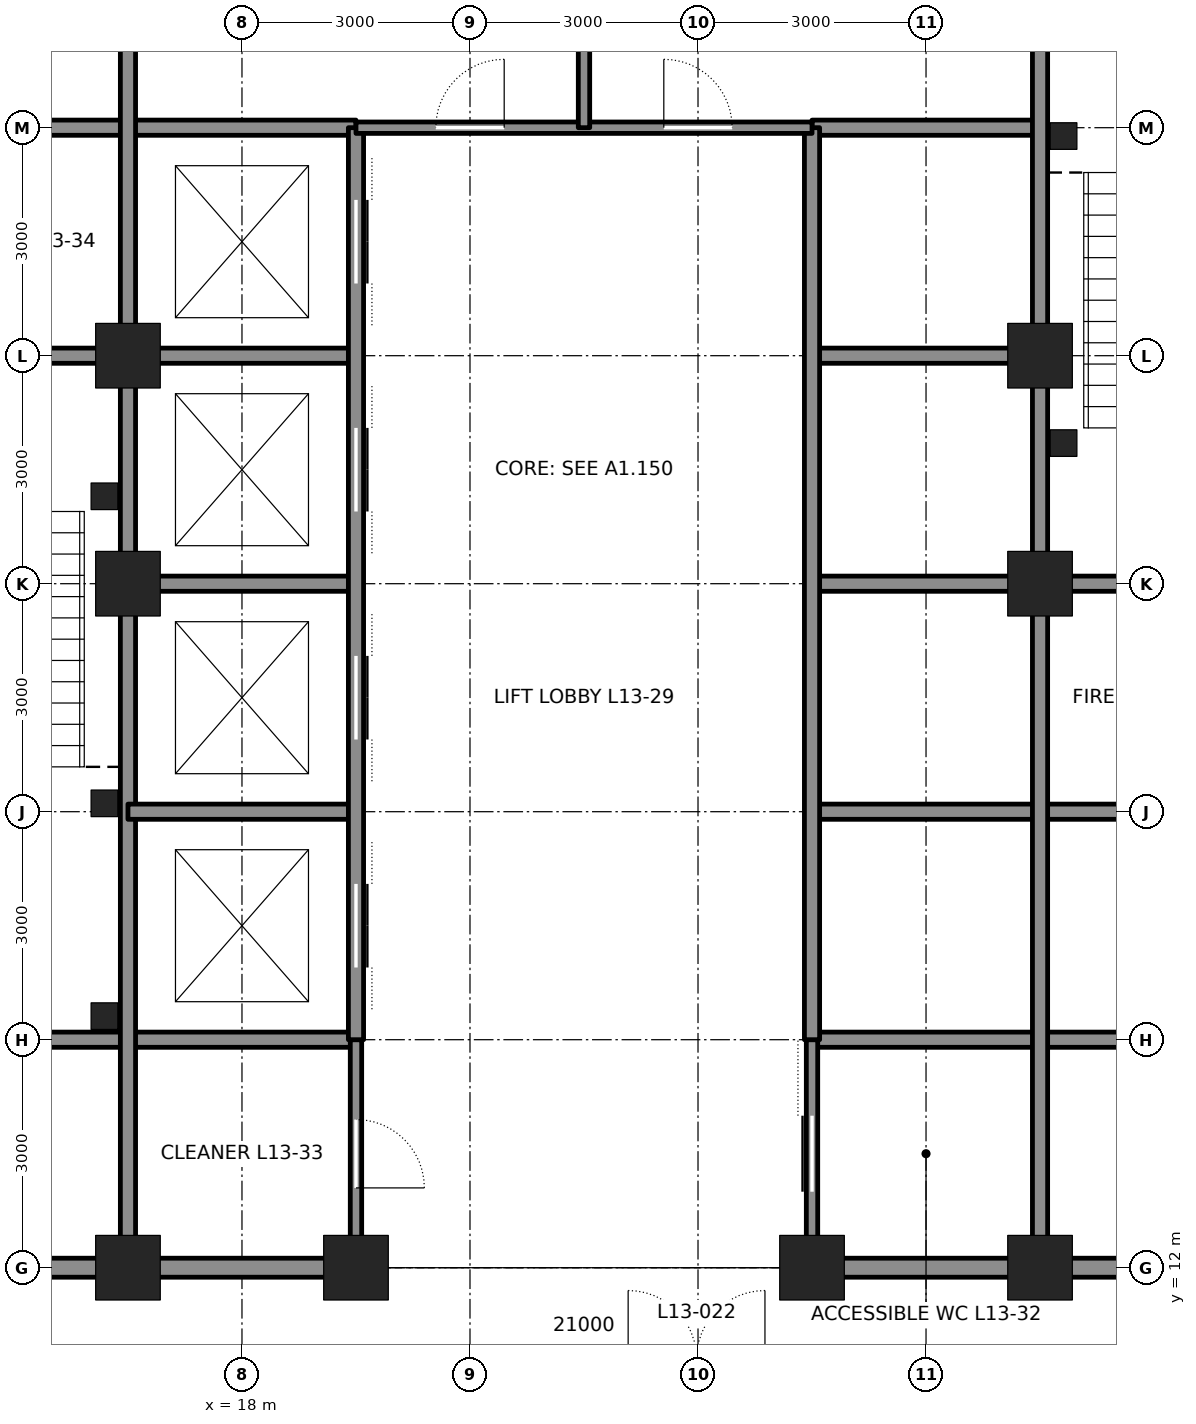
"""IFC4 building model, lengths in metres.
Left out: names, types, materials, properties, quantities, classifications, styles, units other than length and angle.
Written with IfcOpenShell. Run it as: python <this file> out.ifc"""

import sys

from ifc_helpers import new_model, si_unit, direction, frame, frame_2d, origin, origin_2d, place, context, subcontext, project, spatial, rectangle, hollow_rectangle, extrude, element, fill, save


model = new_model("IFC4")
c1 = context("Model", 3, precision=1e-05, world=origin(), true_north=direction((0.0, 1.0)))
c2 = subcontext(c1, "Body", "Model", "MODEL_VIEW")
j1 = project(units=[si_unit("LENGTHUNIT", "METRE"), si_unit("PLANEANGLEUNIT", "RADIAN")], contexts=[c1])
p1 = place(None, origin())
s1 = spatial("IfcSite", under=j1, at=p1, CompositionType="ELEMENT")
p2 = place(p1, origin())
s2 = spatial("IfcBuilding", under=s1, at=p2, CompositionType="ELEMENT")
p3 = place(p2, frame((0.0, 0.0, 64.8)))
s3 = spatial("IfcBuildingStorey", under=s2, at=p3, CompositionType="ELEMENT", Elevation=64.8)
for number, where, z_axis, x_axis in (
    (1, (16.5, 12.0, 0.0), (0.0, 0.0, 1.0), (1.0, 0.0, 0.0)),
    (2, (19.5, 12.0, 0.0), (0.0, 0.0, 1.0), (1.0, 0.0, 0.0)),
    (3, (25.5, 12.0, 0.0), (0.0, 0.0, 1.0), (1.0, 0.0, 0.0)),
    (4, (28.5, 12.0, 0.0), (0.0, 0.0, 1.0), (1.0, 0.0, 0.0)),
    (5, (16.5, 21.0, 0.0), (0.0, 0.0, 1.0), (1.0, 0.0, 0.0)),
    (6, (16.5, 24.0, 0.0), (0.0, 0.0, 1.0), (1.0, 0.0, 0.0)),
    (7, (28.5, 21.0, 0.0), (0.0, 0.0, 1.0), (1.0, 0.0, 0.0)),
    (8, (28.5, 24.0, 0.0), (0.0, 0.0, 1.0), (1.0, 0.0, 0.0)),
):
    element("IfcColumn", number, at=place(p3, frame(where, z_axis=z_axis, x_axis=x_axis)), inside=s3, PredefinedType="COLUMN", context=c2, shape_type="SweptSolid", body=[
        extrude(hollow_rectangle(XDim=0.85, YDim=0.85, WallThickness=0.085, at=origin_2d()), origin(), (0.0, 0.0, 1.0), 4.5),
    ])
p4 = place(p3, frame((12.25, 12.0, 0.0), z_axis=(0.0, 0.0, 1.0), x_axis=(1.0, 0.0, 0.0)))
e9 = element("IfcWall", 9, at=p4, inside=s3, PredefinedType="SOLIDWALL", context=c2, shape_type="SweptSolid", body=[
    extrude(rectangle(XDim=4.0, YDim=0.25, at=frame_2d((2.0, 0.0))), origin(), (0.0, 0.0, 1.0), 3.181),
])
for number, where, z_axis, x_axis in (
    (10, (16.75, 12.0, 0.0), (0.0, 0.0, 1.0), (1.0, 0.0, 0.0)),
    (11, (25.75, 12.0, 0.0), (0.0, 0.0, 1.0), (1.0, 0.0, 0.0)),
):
    element("IfcWall", number, at=place(p3, frame(where, z_axis=z_axis, x_axis=x_axis)), inside=s3, PredefinedType="SOLIDWALL", context=c2, shape_type="SweptSolid", body=[
        extrude(rectangle(XDim=2.5, YDim=0.25, at=frame_2d((1.25, 0.0))), origin(), (0.0, 0.0, 1.0), 3.181),
    ])
p5 = place(p3, frame((28.75, 12.0, 0.0), z_axis=(0.0, 0.0, 1.0), x_axis=(1.0, 0.0, 0.0)))
e12 = element("IfcWall", 12, at=p5, inside=s3, PredefinedType="SOLIDWALL", context=c2, shape_type="SweptSolid", body=[
    extrude(rectangle(XDim=4.0, YDim=0.25, at=frame_2d((2.0, 0.0))), origin(), (0.0, 0.0, 1.0), 3.181),
])
for number, where, z_axis, x_axis in (
    (13, (12.0, 15.0, 0.0), (0.0, 0.0, 1.0), (1.0, 0.0, 0.0)),
    (14, (25.5, 15.0, 0.0), (0.0, 0.0, 1.0), (1.0, 0.0, 0.0)),
):
    element("IfcWall", number, at=place(p3, frame(where, z_axis=z_axis, x_axis=x_axis)), inside=s3, PredefinedType="SOLIDWALL", context=c2, shape_type="SweptSolid", body=[
        extrude(rectangle(XDim=7.5, YDim=0.2, at=frame_2d((3.75, 0.0))), origin(), (0.0, 0.0, 1.0), 4.34),
    ])
p6 = place(p3, frame((12.25, 24.0, 0.0), z_axis=(0.0, 0.0, 1.0), x_axis=(1.0, 0.0, 0.0)))
e15 = element("IfcWall", 15, at=p6, inside=s3, PredefinedType="SOLIDWALL", context=c2, shape_type="SweptSolid", body=[
    extrude(rectangle(XDim=4.0, YDim=0.2, at=frame_2d((2.0, 0.0))), origin(), (0.0, 0.0, 1.0), 3.39),
])
p7 = place(p6, frame((1.4, 0.0, 0.0)))
e16 = element("IfcOpeningElement", 16, at=p7, cuts=e15, PredefinedType="OPENING", context=c2, shape_type="SweptSolid", body=[
    extrude(rectangle(XDim=1.2, YDim=2.1, at=frame_2d((0.6, 1.05))), frame((0.0, 0.11, 0.0), z_axis=(0.0, -1.0, 0.0), x_axis=(1.0, 0.0, 0.0)), (0.0, 0.0, 1.0), 0.22),
])
for number, where, z_axis, x_axis in (
    (17, (16.75, 24.0, 0.0), (0.0, 0.0, 1.0), (1.0, 0.0, 0.0)),
    (18, (25.5, 24.0, 0.0), (0.0, 0.0, 1.0), (1.0, 0.0, 0.0)),
):
    element("IfcWall", number, at=place(p3, frame(where, z_axis=z_axis, x_axis=x_axis)), inside=s3, PredefinedType="SOLIDWALL", context=c2, shape_type="SweptSolid", body=[
        extrude(rectangle(XDim=2.75, YDim=0.2, at=frame_2d((1.375, 0.0))), origin(), (0.0, 0.0, 1.0), 3.39),
    ])
p8 = place(p3, frame((12.0, 27.0, 0.0), z_axis=(0.0, 0.0, 1.0), x_axis=(1.0, 0.0, 0.0)))
e19 = element("IfcWall", 19, at=p8, inside=s3, PredefinedType="SOLIDWALL", context=c2, shape_type="SweptSolid", body=[
    extrude(rectangle(XDim=7.5, YDim=0.2, at=frame_2d((3.75, 0.0))), origin(), (0.0, 0.0, 1.0), 4.34),
])
p9 = place(p8, frame((1.65, 0.0, 0.0)))
e20 = element("IfcOpeningElement", 20, at=p9, cuts=e19, PredefinedType="OPENING", context=c2, shape_type="SweptSolid", body=[
    extrude(rectangle(XDim=1.2, YDim=2.1, at=frame_2d((0.6, 1.05))), frame((0.0, 0.11, 0.0), z_axis=(0.0, -1.0, 0.0), x_axis=(1.0, 0.0, 0.0)), (0.0, 0.0, 1.0), 0.22),
])
p10 = place(p3, frame((25.5, 27.0, 0.0), z_axis=(0.0, 0.0, 1.0), x_axis=(1.0, 0.0, 0.0)))
e21 = element("IfcWall", 21, at=p10, inside=s3, PredefinedType="SOLIDWALL", context=c2, shape_type="SweptSolid", body=[
    extrude(rectangle(XDim=3.0, YDim=0.2, at=frame_2d((1.5, 0.0))), origin(), (0.0, 0.0, 1.0), 4.34),
])
p11 = place(p3, frame((16.5, 12.25, 0.0), z_axis=(0.0, 0.0, 1.0), x_axis=(0.0, 1.0, 0.0)))
e22 = element("IfcWall", 22, at=p11, inside=s3, PredefinedType="SOLIDWALL", context=c2, shape_type="SweptSolid", body=[
    extrude(rectangle(XDim=8.5, YDim=0.2, at=frame_2d((4.25, 0.0))), origin(), (0.0, 0.0, 1.0), 3.413),
])
p12 = place(p3, frame((16.5, 21.25, 0.0), z_axis=(0.0, 0.0, 1.0), x_axis=(0.0, 1.0, 0.0)))
e23 = element("IfcWall", 23, at=p12, inside=s3, PredefinedType="SOLIDWALL", context=c2, shape_type="SweptSolid", body=[
    extrude(rectangle(XDim=2.5, YDim=0.2, at=frame_2d((1.25, 0.0))), origin(), (0.0, 0.0, 1.0), 3.413),
])
p13 = place(p3, frame((16.5, 24.25, 0.0), z_axis=(0.0, 0.0, 1.0), x_axis=(0.0, 1.0, 0.0)))
e24 = element("IfcWall", 24, at=p13, inside=s3, PredefinedType="SOLIDWALL", context=c2, shape_type="SweptSolid", body=[
    extrude(rectangle(XDim=8.5, YDim=0.2, at=frame_2d((4.25, 0.0))), origin(), (0.0, 0.0, 1.0), 3.413),
])
p14 = place(p3, frame((16.5, 18.0, 0.0), z_axis=(0.0, 0.0, 1.0), x_axis=(1.0, 0.0, 0.0)))
e25 = element("IfcWall", 25, at=p14, inside=s3, PredefinedType="SOLIDWALL", context=c2, shape_type="SweptSolid", body=[
    extrude(rectangle(XDim=3.0, YDim=0.2, at=frame_2d((1.5, 0.0))), origin(), (0.0, 0.0, 1.0), 4.34),
])
p15 = place(p3, frame((25.5, 18.0, 0.0), z_axis=(0.0, 0.0, 1.0), x_axis=(1.0, 0.0, 0.0)))
e26 = element("IfcWall", 26, at=p15, inside=s3, PredefinedType="SOLIDWALL", context=c2, shape_type="SweptSolid", body=[
    extrude(rectangle(XDim=7.5, YDim=0.2, at=frame_2d((3.75, 0.0))), origin(), (0.0, 0.0, 1.0), 4.34),
])
p16 = place(p15, frame((4.65, 0.0, 0.0)))
e27 = element("IfcOpeningElement", 27, at=p16, cuts=e26, PredefinedType="OPENING", context=c2, shape_type="SweptSolid", body=[
    extrude(rectangle(XDim=1.2, YDim=2.1, at=frame_2d((0.6, 1.05))), frame((0.0, 0.11, 0.0), z_axis=(0.0, -1.0, 0.0), x_axis=(1.0, 0.0, 0.0)), (0.0, 0.0, 1.0), 0.22),
])
for number, where, z_axis, x_axis in (
    (28, (16.75, 21.0, 0.0), (0.0, 0.0, 1.0), (1.0, 0.0, 0.0)),
    (29, (25.5, 21.0, 0.0), (0.0, 0.0, 1.0), (1.0, 0.0, 0.0)),
):
    element("IfcWall", number, at=place(p3, frame(where, z_axis=z_axis, x_axis=x_axis)), inside=s3, PredefinedType="SOLIDWALL", context=c2, shape_type="SweptSolid", body=[
        extrude(rectangle(XDim=2.75, YDim=0.2, at=frame_2d((1.375, 0.0))), origin(), (0.0, 0.0, 1.0), 3.39),
    ])
p17 = place(p3, frame((28.75, 21.0, 0.0), z_axis=(0.0, 0.0, 1.0), x_axis=(1.0, 0.0, 0.0)))
e30 = element("IfcWall", 30, at=p17, inside=s3, PredefinedType="SOLIDWALL", context=c2, shape_type="SweptSolid", body=[
    extrude(rectangle(XDim=4.0, YDim=0.2, at=frame_2d((2.0, 0.0))), origin(), (0.0, 0.0, 1.0), 3.39),
])
p18 = place(p17, frame((1.4, 0.0, 0.0)))
e31 = element("IfcOpeningElement", 31, at=p18, cuts=e30, PredefinedType="OPENING", context=c2, shape_type="SweptSolid", body=[
    extrude(rectangle(XDim=1.2, YDim=2.1, at=frame_2d((0.6, 1.05))), frame((0.0, 0.11, 0.0), z_axis=(0.0, -1.0, 0.0), x_axis=(1.0, 0.0, 0.0)), (0.0, 0.0, 1.0), 0.22),
])
p19 = place(p3, frame((19.5, 12.25, 0.0), z_axis=(0.0, 0.0, 1.0), x_axis=(0.0, 1.0, 0.0)))
e32 = element("IfcWall", 32, at=p19, inside=s3, PredefinedType="PARTITIONING", context=c2, shape_type="SweptSolid", body=[
    extrude(rectangle(XDim=2.75, YDim=0.15, at=frame_2d((1.375, 0.0))), origin(), (0.0, 0.0, 1.0), 3.365),
])
p20 = place(p19, frame((0.8, 0.0, 0.0)))
e33 = element("IfcOpeningElement", 33, at=p20, cuts=e32, PredefinedType="OPENING", context=c2, shape_type="SweptSolid", body=[
    extrude(rectangle(XDim=0.9, YDim=2.1, at=frame_2d((0.45, 1.05))), frame((0.0, 0.085, 0.0), z_axis=(0.0, -1.0, 0.0), x_axis=(1.0, 0.0, 0.0)), (0.0, 0.0, 1.0), 0.17),
])
p21 = place(p3, frame((19.5, 15.0, 0.0), z_axis=(0.0, 0.0, 1.0), x_axis=(0.0, 1.0, 0.0)))
e34 = element("IfcWall", 34, at=p21, inside=s3, PredefinedType="SOLIDWALL", context=c2, shape_type="SweptSolid", body=[
    extrude(rectangle(XDim=12.0, YDim=0.2, at=frame_2d((6.0, 0.0))), origin(), (0.0, 0.0, 1.0), 3.365),
])
p22 = place(p21, frame((0.95, 0.0, 0.0)))
e35 = element("IfcOpeningElement", 35, at=p22, cuts=e34, PredefinedType="OPENING", context=c2, shape_type="SweptSolid", body=[
    extrude(rectangle(XDim=1.1, YDim=2.1, at=frame_2d((0.55, 1.05))), frame((0.0, 0.11, 0.0), z_axis=(0.0, -1.0, 0.0), x_axis=(1.0, 0.0, 0.0)), (0.0, 0.0, 1.0), 0.22),
])
p23 = place(p21, frame((3.95, 0.0, 0.0)))
e36 = element("IfcOpeningElement", 36, at=p23, cuts=e34, PredefinedType="OPENING", context=c2, shape_type="SweptSolid", body=[
    extrude(rectangle(XDim=1.1, YDim=2.1, at=frame_2d((0.55, 1.05))), frame((0.0, 0.11, 0.0), z_axis=(0.0, -1.0, 0.0), x_axis=(1.0, 0.0, 0.0)), (0.0, 0.0, 1.0), 0.22),
])
p24 = place(p21, frame((6.95, 0.0, 0.0)))
e37 = element("IfcOpeningElement", 37, at=p24, cuts=e34, PredefinedType="OPENING", context=c2, shape_type="SweptSolid", body=[
    extrude(rectangle(XDim=1.1, YDim=2.1, at=frame_2d((0.55, 1.05))), frame((0.0, 0.11, 0.0), z_axis=(0.0, -1.0, 0.0), x_axis=(1.0, 0.0, 0.0)), (0.0, 0.0, 1.0), 0.22),
])
p25 = place(p21, frame((9.95, 0.0, 0.0)))
e38 = element("IfcOpeningElement", 38, at=p25, cuts=e34, PredefinedType="OPENING", context=c2, shape_type="SweptSolid", body=[
    extrude(rectangle(XDim=1.1, YDim=2.1, at=frame_2d((0.55, 1.05))), frame((0.0, 0.11, 0.0), z_axis=(0.0, -1.0, 0.0), x_axis=(1.0, 0.0, 0.0)), (0.0, 0.0, 1.0), 0.22),
])
p26 = place(p3, frame((25.5, 12.25, 0.0), z_axis=(0.0, 0.0, 1.0), x_axis=(0.0, 1.0, 0.0)))
e39 = element("IfcWall", 39, at=p26, inside=s3, PredefinedType="PARTITIONING", context=c2, shape_type="SweptSolid", body=[
    extrude(rectangle(XDim=2.75, YDim=0.15, at=frame_2d((1.375, 0.0))), origin(), (0.0, 0.0, 1.0), 3.365),
])
p27 = place(p26, frame((0.75, 0.0, 0.0)))
e40 = element("IfcOpeningElement", 40, at=p27, cuts=e39, PredefinedType="OPENING", context=c2, shape_type="SweptSolid", body=[
    extrude(rectangle(XDim=1.0, YDim=2.1, at=frame_2d((0.5, 1.05))), frame((0.0, 0.085, 0.0), z_axis=(0.0, -1.0, 0.0), x_axis=(1.0, 0.0, 0.0)), (0.0, 0.0, 1.0), 0.17),
])
p28 = place(p3, frame((25.5, 15.0, 0.0), z_axis=(0.0, 0.0, 1.0), x_axis=(0.0, 1.0, 0.0)))
e41 = element("IfcWall", 41, at=p28, inside=s3, PredefinedType="SOLIDWALL", context=c2, shape_type="SweptSolid", body=[
    extrude(rectangle(XDim=12.0, YDim=0.2, at=frame_2d((6.0, 0.0))), origin(), (0.0, 0.0, 1.0), 3.365),
])
p29 = place(p3, frame((28.5, 12.25, 0.0), z_axis=(0.0, 0.0, 1.0), x_axis=(0.0, 1.0, 0.0)))
e42 = element("IfcWall", 42, at=p29, inside=s3, PredefinedType="SOLIDWALL", context=c2, shape_type="SweptSolid", body=[
    extrude(rectangle(XDim=8.5, YDim=0.2, at=frame_2d((4.25, 0.0))), origin(), (0.0, 0.0, 1.0), 3.413),
])
p30 = place(p3, frame((28.5, 21.25, 0.0), z_axis=(0.0, 0.0, 1.0), x_axis=(0.0, 1.0, 0.0)))
e43 = element("IfcWall", 43, at=p30, inside=s3, PredefinedType="SOLIDWALL", context=c2, shape_type="SweptSolid", body=[
    extrude(rectangle(XDim=2.5, YDim=0.2, at=frame_2d((1.25, 0.0))), origin(), (0.0, 0.0, 1.0), 3.413),
])
p31 = place(p3, frame((28.5, 24.25, 0.0), z_axis=(0.0, 0.0, 1.0), x_axis=(0.0, 1.0, 0.0)))
e44 = element("IfcWall", 44, at=p31, inside=s3, PredefinedType="SOLIDWALL", context=c2, shape_type="SweptSolid", body=[
    extrude(rectangle(XDim=8.5, YDim=0.2, at=frame_2d((4.25, 0.0))), origin(), (0.0, 0.0, 1.0), 3.413),
])
p32 = place(p3, frame((19.5, 27.0, 0.0), z_axis=(0.0, 0.0, 1.0), x_axis=(1.0, 0.0, 0.0)))
e45 = element("IfcWall", 45, at=p32, inside=s3, PredefinedType="PARTITIONING", context=c2, shape_type="SweptSolid", body=[
    extrude(rectangle(XDim=6.0, YDim=0.15, at=frame_2d((3.0, 0.0))), origin(), (0.0, 0.0, 1.0), 4.34),
])
p33 = place(p32, frame((1.05, 0.0, 0.0)))
e46 = element("IfcOpeningElement", 46, at=p33, cuts=e45, PredefinedType="OPENING", context=c2, shape_type="SweptSolid", body=[
    extrude(rectangle(XDim=0.9, YDim=2.1, at=frame_2d((0.45, 1.05))), frame((0.0, 0.085, 0.0), z_axis=(0.0, -1.0, 0.0), x_axis=(1.0, 0.0, 0.0)), (0.0, 0.0, 1.0), 0.17),
])
p34 = place(p32, frame((4.05, 0.0, 0.0)))
e47 = element("IfcOpeningElement", 47, at=p34, cuts=e45, PredefinedType="OPENING", context=c2, shape_type="SweptSolid", body=[
    extrude(rectangle(XDim=0.9, YDim=2.1, at=frame_2d((0.45, 1.05))), frame((0.0, 0.085, 0.0), z_axis=(0.0, -1.0, 0.0), x_axis=(1.0, 0.0, 0.0)), (0.0, 0.0, 1.0), 0.17),
])
p35 = place(p3, frame((22.5, 27.0, 0.0), z_axis=(0.0, 0.0, 1.0), x_axis=(0.0, 1.0, 0.0)))
e48 = element("IfcWall", 48, at=p35, inside=s3, PredefinedType="PARTITIONING", context=c2, shape_type="SweptSolid", body=[
    extrude(rectangle(XDim=6.0, YDim=0.15, at=frame_2d((3.0, 0.0))), origin(), (0.0, 0.0, 1.0), 4.34),
])
for number, where, z_axis, x_axis in (
    (49, (16.19, 15.31, 0.0), (0.0, 0.0, 1.0), (1.0, 0.0, 0.0)),
    (50, (16.19, 18.11, 0.0), (0.0, 0.0, 1.0), (1.0, 0.0, 0.0)),
    (51, (16.19, 22.15, 0.0), (0.0, 0.0, 1.0), (1.0, 0.0, 0.0)),
    (52, (28.81, 26.89, 0.0), (0.0, 0.0, 1.0), (1.0, 0.0, 0.0)),
    (53, (28.81, 22.85, 0.0), (0.0, 0.0, 1.0), (1.0, 0.0, 0.0)),
):
    element("IfcColumn", number, at=place(p3, frame(where, z_axis=z_axis, x_axis=x_axis)), inside=s3, PredefinedType="COLUMN", context=c2, shape_type="SweptSolid", body=[
        extrude(hollow_rectangle(XDim=0.35, YDim=0.35, WallThickness=0.035, at=origin_2d()), origin(), (0.0, 0.0, 1.0), 4.5),
    ])
p36 = place(p33, origin())
e54 = element("IfcDoor", 54, at=p36, inside=s3, OperationType="SINGLE_SWING_RIGHT", PredefinedType="DOOR", context=c2, shape_type="SweptSolid", body=[
    extrude(rectangle(XDim=0.9, YDim=2.1, at=frame_2d((0.45, 1.05))), frame((0.0, 0.025, 0.0), z_axis=(0.0, -1.0, 0.0), x_axis=(1.0, 0.0, 0.0)), (0.0, 0.0, 1.0), 0.05),
])
fill(e46, e54)
p37 = place(p34, origin())
e55 = element("IfcDoor", 55, at=p37, inside=s3, OperationType="SINGLE_SWING_LEFT", PredefinedType="DOOR", context=c2, shape_type="SweptSolid", body=[
    extrude(rectangle(XDim=0.9, YDim=2.1, at=frame_2d((0.45, 1.05))), frame((0.0, 0.025, 0.0), z_axis=(0.0, -1.0, 0.0), x_axis=(1.0, 0.0, 0.0)), (0.0, 0.0, 1.0), 0.05),
])
fill(e47, e55)
p38 = place(p27, origin())
e56 = element("IfcDoor", 56, at=p38, inside=s3, OperationType="SLIDING_TO_LEFT", PredefinedType="DOOR", context=c2, shape_type="SweptSolid", body=[
    extrude(rectangle(XDim=1.0, YDim=2.1, at=frame_2d((0.5, 1.05))), frame((0.0, 0.025, 0.0), z_axis=(0.0, -1.0, 0.0), x_axis=(1.0, 0.0, 0.0)), (0.0, 0.0, 1.0), 0.05),
])
fill(e40, e56)
p39 = place(p20, frame((0.9, 0.0, 0.0), z_axis=(0.0, 0.0, 1.0), x_axis=(-1.0, 0.0, 0.0)))
e57 = element("IfcDoor", 57, at=p39, inside=s3, OperationType="SINGLE_SWING_RIGHT", PredefinedType="DOOR", context=c2, shape_type="SweptSolid", body=[
    extrude(rectangle(XDim=0.9, YDim=2.1, at=frame_2d((0.45, 1.05))), frame((0.0, 0.025, 0.0), z_axis=(0.0, -1.0, 0.0), x_axis=(1.0, 0.0, 0.0)), (0.0, 0.0, 1.0), 0.05),
])
fill(e33, e57)
p40 = place(p22, origin())
e58 = element("IfcDoor", 58, at=p40, inside=s3, OperationType="DOUBLE_DOOR_SLIDING", PredefinedType="DOOR", context=c2, shape_type="SweptSolid", body=[
    extrude(rectangle(XDim=1.1, YDim=2.1, at=frame_2d((0.55, 1.05))), frame((0.0, 0.025, 0.0), z_axis=(0.0, -1.0, 0.0), x_axis=(1.0, 0.0, 0.0)), (0.0, 0.0, 1.0), 0.05),
])
fill(e35, e58)
p41 = place(p23, origin())
e59 = element("IfcDoor", 59, at=p41, inside=s3, OperationType="DOUBLE_DOOR_SLIDING", PredefinedType="DOOR", context=c2, shape_type="SweptSolid", body=[
    extrude(rectangle(XDim=1.1, YDim=2.1, at=frame_2d((0.55, 1.05))), frame((0.0, 0.025, 0.0), z_axis=(0.0, -1.0, 0.0), x_axis=(1.0, 0.0, 0.0)), (0.0, 0.0, 1.0), 0.05),
])
fill(e36, e59)
p42 = place(p24, origin())
e60 = element("IfcDoor", 60, at=p42, inside=s3, OperationType="DOUBLE_DOOR_SLIDING", PredefinedType="DOOR", context=c2, shape_type="SweptSolid", body=[
    extrude(rectangle(XDim=1.1, YDim=2.1, at=frame_2d((0.55, 1.05))), frame((0.0, 0.025, 0.0), z_axis=(0.0, -1.0, 0.0), x_axis=(1.0, 0.0, 0.0)), (0.0, 0.0, 1.0), 0.05),
])
fill(e37, e60)
p43 = place(p25, origin())
e61 = element("IfcDoor", 61, at=p43, inside=s3, OperationType="DOUBLE_DOOR_SLIDING", PredefinedType="DOOR", context=c2, shape_type="SweptSolid", body=[
    extrude(rectangle(XDim=1.1, YDim=2.1, at=frame_2d((0.55, 1.05))), frame((0.0, 0.025, 0.0), z_axis=(0.0, -1.0, 0.0), x_axis=(1.0, 0.0, 0.0)), (0.0, 0.0, 1.0), 0.05),
])
fill(e38, e61)
save(model, sys.argv[1])
